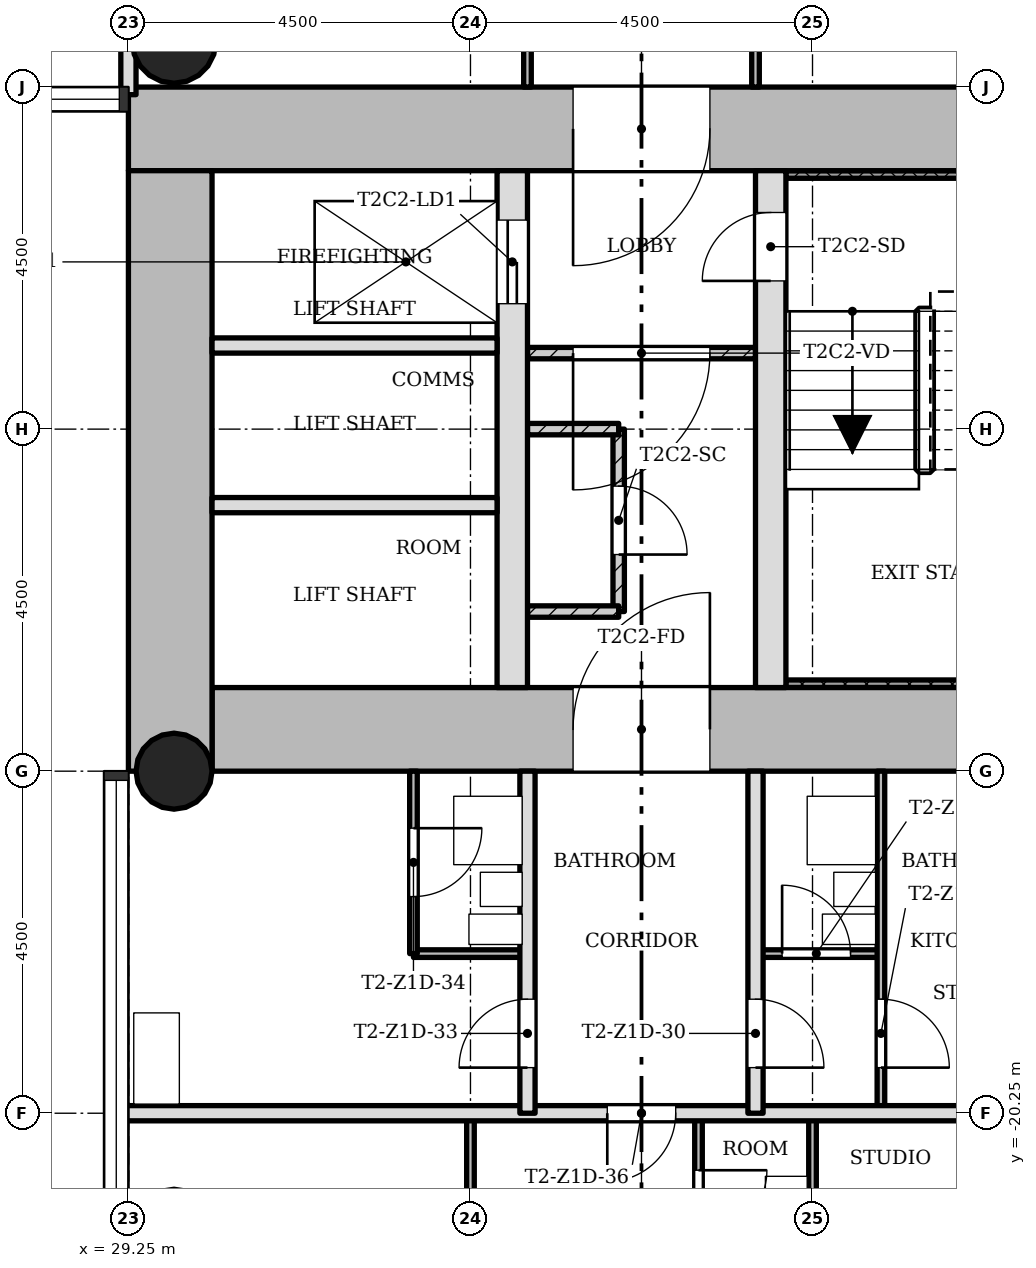
"""IFC4 building model, lengths in metres.
Left out: names, types, materials, properties, quantities, classifications, styles, units other than length and angle.
Written with IfcOpenShell. Run it as: python <this file> out.ifc"""

import sys

from ifc_helpers import new_model, si_unit, direction, frame, frame_2d, origin, origin_2d, place, context, subcontext, project, spatial, rectangle, hollow_circle, extrude, element, fill, save


model = new_model("IFC4")
c1 = context("Model", 3, precision=1e-05, world=origin(), true_north=direction((0.0, 1.0)))
c2 = subcontext(c1, "Body", "Model", "MODEL_VIEW")
j1 = project(units=[si_unit("LENGTHUNIT", "METRE"), si_unit("PLANEANGLEUNIT", "RADIAN")], contexts=[c1])
p1 = place(None, origin())
s1 = spatial("IfcSite", under=j1, at=p1, CompositionType="ELEMENT")
p2 = place(p1, origin())
s2 = spatial("IfcBuilding", under=s1, at=p2, CompositionType="ELEMENT")
p3 = place(p2, frame((0.0, 0.0, 61.9)))
s3 = spatial("IfcBuildingStorey", under=s2, at=p3, CompositionType="ELEMENT", Elevation=61.9)
p4 = place(p3, frame((30.35, -15.2, 0.0), z_axis=(0.0, 0.0, 1.0), x_axis=(1.0, 0.0, 0.0)))
e1 = element("IfcWall", 1, at=p4, inside=s3, PredefinedType="SHEAR", context=c2, shape_type="SweptSolid", body=[
    extrude(rectangle(XDim=12.4, YDim=1.1, at=frame_2d((6.2, 0.0))), origin(), (0.0, 0.0, 1.0), 3.4),
])
p5 = place(p4, frame((4.75, 0.0, 0.0)))
e2 = element("IfcOpeningElement", 2, at=p5, cuts=e1, PredefinedType="OPENING", context=c2, shape_type="SweptSolid", body=[
    extrude(rectangle(XDim=1.8, YDim=2.1, at=frame_2d((0.9, 1.05))), frame((0.0, 0.56, 0.0), z_axis=(0.0, -1.0, 0.0), x_axis=(1.0, 0.0, 0.0)), (0.0, 0.0, 1.0), 1.12),
])
p6 = place(p3, frame((41.65, -7.3, 0.0), z_axis=(0.0, 0.0, 1.0), x_axis=(-1.0, 0.0, 0.0)))
e3 = element("IfcWall", 3, at=p6, inside=s3, PredefinedType="SHEAR", context=c2, shape_type="SweptSolid", body=[
    extrude(rectangle(XDim=12.4, YDim=1.1, at=frame_2d((6.2, 0.0))), origin(), (0.0, 0.0, 1.0), 3.4),
])
p7 = place(p6, frame((4.75, 0.0, 0.0)))
e4 = element("IfcOpeningElement", 4, at=p7, cuts=e3, PredefinedType="OPENING", context=c2, shape_type="SweptSolid", body=[
    extrude(rectangle(XDim=1.8, YDim=2.1, at=frame_2d((0.9, 1.05))), frame((0.0, 0.56, 0.0), z_axis=(0.0, -1.0, 0.0), x_axis=(1.0, 0.0, 0.0)), (0.0, 0.0, 1.0), 1.12),
])
p8 = place(p3, frame((29.8, -7.85, 0.0), z_axis=(0.0, 0.0, 1.0), x_axis=(0.0, -1.0, 0.0)))
e5 = element("IfcWall", 5, at=p8, inside=s3, PredefinedType="SHEAR", context=c2, shape_type="SweptSolid", body=[
    extrude(rectangle(XDim=7.9, YDim=1.1, at=frame_2d((3.95, 0.0))), origin(), (0.0, 0.0, 1.0), 3.4),
])
p9 = place(p3, frame((34.3, -14.65, 0.0), z_axis=(0.0, 0.0, 1.0), x_axis=(0.0, 1.0, 0.0)))
e6 = element("IfcWall", 6, at=p9, inside=s3, PredefinedType="SHEAR", context=c2, shape_type="SweptSolid", body=[
    extrude(rectangle(XDim=6.8, YDim=0.4, at=frame_2d((3.4, 0.0))), origin(), (0.0, 0.0, 1.0), 3.4),
])
p10 = place(p9, frame((5.05, 0.0, 0.0)))
e7 = element("IfcOpeningElement", 7, at=p10, cuts=e6, PredefinedType="OPENING", context=c2, shape_type="SweptSolid", body=[
    extrude(rectangle(XDim=1.1, YDim=2.1, at=frame_2d((0.55, 1.05))), frame((0.0, 0.21, 0.0), z_axis=(0.0, -1.0, 0.0), x_axis=(1.0, 0.0, 0.0)), (0.0, 0.0, 1.0), 0.42),
])
p11 = place(p3, frame((37.7, -14.65, 0.0), z_axis=(0.0, 0.0, 1.0), x_axis=(0.0, 1.0, 0.0)))
e8 = element("IfcWall", 8, at=p11, inside=s3, PredefinedType="SHEAR", context=c2, shape_type="SweptSolid", body=[
    extrude(rectangle(XDim=6.8, YDim=0.4, at=frame_2d((3.4, 0.0))), origin(), (0.0, 0.0, 1.0), 3.4),
])
p12 = place(p11, frame((5.35, 0.0, 0.0)))
e9 = element("IfcOpeningElement", 9, at=p12, cuts=e8, PredefinedType="OPENING", context=c2, shape_type="SweptSolid", body=[
    extrude(rectangle(XDim=0.9, YDim=2.1, at=frame_2d((0.45, 1.05))), frame((0.0, 0.21, 0.0), z_axis=(0.0, -1.0, 0.0), x_axis=(1.0, 0.0, 0.0)), (0.0, 0.0, 1.0), 0.42),
])
p13 = place(p3, frame((29.85, -15.75, 0.0), z_axis=(0.0, 0.0, 1.0), x_axis=(1.0, 0.0, 0.0)))
e10 = element("IfcColumn", 10, at=p13, inside=s3, PredefinedType="COLUMN", context=c2, shape_type="SweptSolid", body=[
    extrude(hollow_circle(Radius=0.5, WallThickness=0.036, at=origin_2d()), origin(), (0.0, 0.0, 1.0), 3.4),
])
p14 = place(p3, frame((29.85, -6.15, 0.0), z_axis=(0.0, 0.0, 1.0), x_axis=(1.0, 0.0, 0.0)))
e11 = element("IfcColumn", 11, at=p14, inside=s3, PredefinedType="COLUMN", context=c2, shape_type="SweptSolid", body=[
    extrude(hollow_circle(Radius=0.55, WallThickness=0.04, at=origin_2d()), origin(), (0.0, 0.0, 1.0), 3.4),
])
p15 = place(p3, frame((34.5, -10.25, 0.0), z_axis=(0.0, 0.0, 1.0), x_axis=(1.0, 0.0, 0.0)))
e12 = element("IfcWall", 12, at=p15, inside=s3, PredefinedType="PARTITIONING", context=c2, shape_type="SweptSolid", body=[
    extrude(rectangle(XDim=3.0, YDim=0.15, at=frame_2d((1.5, 0.0))), origin(), (0.0, 0.0, 1.0), 3.0),
])
p16 = place(p15, frame((0.6, 0.0, 0.0)))
e13 = element("IfcOpeningElement", 13, at=p16, cuts=e12, PredefinedType="OPENING", context=c2, shape_type="SweptSolid", body=[
    extrude(rectangle(XDim=1.8, YDim=2.1, at=frame_2d((0.9, 1.05))), frame((0.0, 0.085, 0.0), z_axis=(0.0, -1.0, 0.0), x_axis=(1.0, 0.0, 0.0)), (0.0, 0.0, 1.0), 0.17),
])
for number, where, z_axis, x_axis in (
    (14, (30.35, -10.15, 0.0), (0.0, 0.0, 1.0), (1.0, 0.0, 0.0)),
    (15, (30.35, -12.25, 0.0), (0.0, 0.0, 1.0), (1.0, 0.0, 0.0)),
):
    element("IfcWall", number, at=place(p3, frame(where, z_axis=z_axis, x_axis=x_axis)), inside=s3, PredefinedType="SOLIDWALL", context=c2, shape_type="SweptSolid", body=[
        extrude(rectangle(XDim=3.75, YDim=0.2, at=frame_2d((1.875, 0.0))), origin(), (0.0, 0.0, 1.0), 3.0),
    ])
p17 = place(p3, frame((35.7, -11.25, 0.0), z_axis=(0.0, 0.0, 1.0), x_axis=(0.0, -1.0, 0.0)))
e16 = element("IfcWall", 16, at=p17, inside=s3, PredefinedType="PARTITIONING", context=c2, shape_type="SweptSolid", body=[
    extrude(rectangle(XDim=2.4, YDim=0.15, at=frame_2d((1.2, 0.0))), origin(), (0.0, 0.0, 1.0), 3.0),
])
p18 = place(p17, frame((0.75, 0.0, 0.0)))
e17 = element("IfcOpeningElement", 17, at=p18, cuts=e16, PredefinedType="OPENING", context=c2, shape_type="SweptSolid", body=[
    extrude(rectangle(XDim=0.9, YDim=2.1, at=frame_2d((0.45, 1.05))), frame((0.0, 0.085, 0.0), z_axis=(0.0, -1.0, 0.0), x_axis=(1.0, 0.0, 0.0)), (0.0, 0.0, 1.0), 0.17),
])
for number, where, z_axis, x_axis in (
    (18, (35.7, -11.25, 0.0), (0.0, 0.0, 1.0), (-1.0, 0.0, 0.0)),
    (19, (35.7, -13.65, 0.0), (0.0, 0.0, 1.0), (-1.0, 0.0, 0.0)),
):
    element("IfcWall", number, at=place(p3, frame(where, z_axis=z_axis, x_axis=x_axis)), inside=s3, PredefinedType="PARTITIONING", context=c2, shape_type="SweptSolid", body=[
        extrude(rectangle(XDim=1.2, YDim=0.15, at=frame_2d((0.6, 0.0))), origin(), (0.0, 0.0, 1.0), 3.0),
    ])
p19 = place(p3, frame((42.85, -20.25, 0.0), z_axis=(0.0, 0.0, 1.0), x_axis=(-1.0, 0.0, 0.0)))
e20 = element("IfcWall", 20, at=p19, inside=s3, PredefinedType="SOLIDWALL", context=c2, shape_type="SweptSolid", body=[
    extrude(rectangle(XDim=13.7, YDim=0.2, at=frame_2d((6.85, 0.0))), origin(), (0.0, 0.0, 1.0), 3.0),
])
p20 = place(p19, frame((6.4, 0.0, 0.0)))
e21 = element("IfcOpeningElement", 21, at=p20, cuts=e20, PredefinedType="OPENING", context=c2, shape_type="SweptSolid", body=[
    extrude(rectangle(XDim=0.9, YDim=2.1, at=frame_2d((0.45, 1.05))), frame((0.0, 0.11, 0.0), z_axis=(0.0, -1.0, 0.0), x_axis=(1.0, 0.0, 0.0)), (0.0, 0.0, 1.0), 0.22),
])
p21 = place(p3, frame((39.15, -18.15, 0.0), z_axis=(0.0, 0.0, 1.0), x_axis=(-1.0, 0.0, 0.0)))
e22 = element("IfcWall", 22, at=p21, inside=s3, PredefinedType="PARTITIONING", context=c2, shape_type="SweptSolid", body=[
    extrude(rectangle(XDim=1.65, YDim=0.1, at=frame_2d((0.825, 0.0))), origin(), (0.0, 0.0, 1.0), 3.0),
])
p22 = place(p21, frame((0.4, 0.0, 0.0)))
e23 = element("IfcOpeningElement", 23, at=p22, cuts=e22, PredefinedType="OPENING", context=c2, shape_type="SweptSolid", body=[
    extrude(rectangle(XDim=0.9, YDim=2.1, at=frame_2d((0.45, 1.05))), frame((0.0, 0.06, 0.0), z_axis=(0.0, -1.0, 0.0), x_axis=(1.0, 0.0, 0.0)), (0.0, 0.0, 1.0), 0.12),
])
p23 = place(p3, frame((34.5, -18.15, 0.0), z_axis=(0.0, 0.0, 1.0), x_axis=(-1.0, 0.0, 0.0)))
e24 = element("IfcWall", 24, at=p23, inside=s3, PredefinedType="PARTITIONING", context=c2, shape_type="SweptSolid", body=[
    extrude(rectangle(XDim=1.5, YDim=0.1, at=frame_2d((0.75, 0.0))), origin(), (0.0, 0.0, 1.0), 3.0),
])
p24 = place(p3, frame((39.15, -20.25, 0.0), z_axis=(0.0, 0.0, 1.0), x_axis=(0.0, 1.0, 0.0)))
e25 = element("IfcWall", 25, at=p24, inside=s3, PredefinedType="PARTITIONING", context=c2, shape_type="SweptSolid", body=[
    extrude(rectangle(XDim=4.5, YDim=0.1, at=frame_2d((2.25, 0.0))), origin(), (0.0, 0.0, 1.0), 3.0),
])
p25 = place(p24, frame((0.6, 0.0, 0.0)))
e26 = element("IfcOpeningElement", 26, at=p25, cuts=e25, PredefinedType="OPENING", context=c2, shape_type="SweptSolid", body=[
    extrude(rectangle(XDim=0.9, YDim=2.1, at=frame_2d((0.45, 1.05))), frame((0.0, 0.06, 0.0), z_axis=(0.0, -1.0, 0.0), x_axis=(1.0, 0.0, 0.0)), (0.0, 0.0, 1.0), 0.12),
])
p26 = place(p3, frame((38.25, -24.85, 0.0), z_axis=(0.0, 0.0, 1.0), x_axis=(0.0, 1.0, 0.0)))
e27 = element("IfcWall", 27, at=p26, inside=s3, PredefinedType="PARTITIONING", context=c2, shape_type="SweptSolid", body=[
    extrude(rectangle(XDim=4.6, YDim=0.1, at=frame_2d((2.3, 0.0))), origin(), (0.0, 0.0, 1.0), 3.0),
])
p27 = place(p26, frame((1.25, 0.0, 0.0)))
e28 = element("IfcOpeningElement", 28, at=p27, cuts=e27, PredefinedType="OPENING", context=c2, shape_type="SweptSolid", body=[
    extrude(rectangle(XDim=0.9, YDim=2.1, at=frame_2d((0.45, 1.05))), frame((0.0, 0.06, 0.0), z_axis=(0.0, -1.0, 0.0), x_axis=(1.0, 0.0, 0.0)), (0.0, 0.0, 1.0), 0.12),
])
p28 = place(p3, frame((37.5, -6.75, 0.0), z_axis=(0.0, 0.0, 1.0), x_axis=(0.0, 1.0, 0.0)))
e29 = element("IfcWall", 29, at=p28, inside=s3, PredefinedType="PARTITIONING", context=c2, shape_type="SweptSolid", body=[
    extrude(rectangle(XDim=5.85, YDim=0.1, at=frame_2d((2.925, 0.0))), origin(), (0.0, 0.0, 1.0), 3.0),
])
p29 = place(p28, frame((1.575, 0.0, 0.0)))
e30 = element("IfcOpeningElement", 30, at=p29, cuts=e29, PredefinedType="OPENING", context=c2, shape_type="SweptSolid", body=[
    extrude(rectangle(XDim=0.9, YDim=2.1, at=frame_2d((0.45, 1.05))), frame((0.0, 0.06, 0.0), z_axis=(0.0, -1.0, 0.0), x_axis=(1.0, 0.0, 0.0)), (0.0, 0.0, 1.0), 0.12),
])
p30 = place(p3, frame((37.5, -20.25, 0.0), z_axis=(0.0, 0.0, 1.0), x_axis=(0.0, 1.0, 0.0)))
e31 = element("IfcWall", 31, at=p30, inside=s3, PredefinedType="SOLIDWALL", context=c2, shape_type="SweptSolid", body=[
    extrude(rectangle(XDim=4.5, YDim=0.2, at=frame_2d((2.25, 0.0))), origin(), (0.0, 0.0, 1.0), 3.0),
])
p31 = place(p30, frame((0.6, 0.0, 0.0)))
e32 = element("IfcOpeningElement", 32, at=p31, cuts=e31, PredefinedType="OPENING", context=c2, shape_type="SweptSolid", body=[
    extrude(rectangle(XDim=0.9, YDim=2.1, at=frame_2d((0.45, 1.05))), frame((0.0, 0.11, 0.0), z_axis=(0.0, -1.0, 0.0), x_axis=(1.0, 0.0, 0.0)), (0.0, 0.0, 1.0), 0.22),
])
p32 = place(p3, frame((36.75, -22.65, 0.0), z_axis=(0.0, 0.0, 1.0), x_axis=(0.0, 1.0, 0.0)))
e33 = element("IfcWall", 33, at=p32, inside=s3, PredefinedType="PARTITIONING", context=c2, shape_type="SweptSolid", body=[
    extrude(rectangle(XDim=2.4, YDim=0.1, at=frame_2d((1.2, 0.0))), origin(), (0.0, 0.0, 1.0), 3.0),
])
p33 = place(p32, frame((0.75, 0.0, 0.0)))
e34 = element("IfcOpeningElement", 34, at=p33, cuts=e33, PredefinedType="OPENING", context=c2, shape_type="SweptSolid", body=[
    extrude(rectangle(XDim=0.9, YDim=2.1, at=frame_2d((0.45, 1.05))), frame((0.0, 0.06, 0.0), z_axis=(0.0, -1.0, 0.0), x_axis=(1.0, 0.0, 0.0)), (0.0, 0.0, 1.0), 0.12),
])
p34 = place(p3, frame((34.5, -6.75, 0.0), z_axis=(0.0, 0.0, 1.0), x_axis=(0.0, 1.0, 0.0)))
e35 = element("IfcWall", 35, at=p34, inside=s3, PredefinedType="PARTITIONING", context=c2, shape_type="SweptSolid", body=[
    extrude(rectangle(XDim=5.85, YDim=0.1, at=frame_2d((2.925, 0.0))), origin(), (0.0, 0.0, 1.0), 3.0),
])
p35 = place(p34, frame((2.475, 0.0, 0.0)))
e36 = element("IfcOpeningElement", 36, at=p35, cuts=e35, PredefinedType="OPENING", context=c2, shape_type="SweptSolid", body=[
    extrude(rectangle(XDim=0.9, YDim=2.1, at=frame_2d((0.45, 1.05))), frame((0.0, 0.06, 0.0), z_axis=(0.0, -1.0, 0.0), x_axis=(1.0, 0.0, 0.0)), (0.0, 0.0, 1.0), 0.12),
])
p36 = place(p3, frame((34.5, -20.25, 0.0), z_axis=(0.0, 0.0, 1.0), x_axis=(0.0, 1.0, 0.0)))
e37 = element("IfcWall", 37, at=p36, inside=s3, PredefinedType="SOLIDWALL", context=c2, shape_type="SweptSolid", body=[
    extrude(rectangle(XDim=4.5, YDim=0.2, at=frame_2d((2.25, 0.0))), origin(), (0.0, 0.0, 1.0), 3.0),
])
p37 = place(p36, frame((0.6, 0.0, 0.0)))
e38 = element("IfcOpeningElement", 38, at=p37, cuts=e37, PredefinedType="OPENING", context=c2, shape_type="SweptSolid", body=[
    extrude(rectangle(XDim=0.9, YDim=2.1, at=frame_2d((0.45, 1.05))), frame((0.0, 0.11, 0.0), z_axis=(0.0, -1.0, 0.0), x_axis=(1.0, 0.0, 0.0)), (0.0, 0.0, 1.0), 0.22),
])
p38 = place(p3, frame((33.75, -24.85, 0.0), z_axis=(0.0, 0.0, 1.0), x_axis=(0.0, 1.0, 0.0)))
e39 = element("IfcWall", 39, at=p38, inside=s3, PredefinedType="PARTITIONING", context=c2, shape_type="SweptSolid", body=[
    extrude(rectangle(XDim=4.6, YDim=0.1, at=frame_2d((2.3, 0.0))), origin(), (0.0, 0.0, 1.0), 3.0),
])
p39 = place(p38, frame((1.9, 0.0, 0.0)))
e40 = element("IfcOpeningElement", 40, at=p39, cuts=e39, PredefinedType="OPENING", context=c2, shape_type="SweptSolid", body=[
    extrude(rectangle(XDim=0.9, YDim=2.1, at=frame_2d((0.45, 1.05))), frame((0.0, 0.06, 0.0), z_axis=(0.0, -1.0, 0.0), x_axis=(1.0, 0.0, 0.0)), (0.0, 0.0, 1.0), 0.12),
])
p40 = place(p3, frame((33.0, -18.15, 0.0), z_axis=(0.0, 0.0, 1.0), x_axis=(0.0, 1.0, 0.0)))
e41 = element("IfcWall", 41, at=p40, inside=s3, PredefinedType="PARTITIONING", context=c2, shape_type="SweptSolid", body=[
    extrude(rectangle(XDim=2.4, YDim=0.1, at=frame_2d((1.2, 0.0))), origin(), (0.0, 0.0, 1.0), 3.0),
])
p41 = place(p40, frame((0.75, 0.0, 0.0)))
e42 = element("IfcOpeningElement", 42, at=p41, cuts=e41, PredefinedType="OPENING", context=c2, shape_type="SweptSolid", body=[
    extrude(rectangle(XDim=0.9, YDim=2.1, at=frame_2d((0.45, 1.05))), frame((0.0, 0.06, 0.0), z_axis=(0.0, -1.0, 0.0), x_axis=(1.0, 0.0, 0.0)), (0.0, 0.0, 1.0), 0.12),
])
p42 = place(p3, frame((29.25, -6.85, 0.0), z_axis=(0.0, 0.0, 1.0), x_axis=(0.0, 1.0, 0.0)))
e43 = element("IfcWall", 43, at=p42, inside=s3, PredefinedType="SOLIDWALL", context=c2, shape_type="SweptSolid", body=[
    extrude(rectangle(XDim=13.7, YDim=0.2, at=frame_2d((6.85, 0.0))), origin(), (0.0, 0.0, 1.0), 3.0),
])
p43 = place(p42, frame((6.4, 0.0, 0.0)))
e44 = element("IfcOpeningElement", 44, at=p43, cuts=e43, PredefinedType="OPENING", context=c2, shape_type="SweptSolid", body=[
    extrude(rectangle(XDim=0.9, YDim=2.1, at=frame_2d((0.45, 1.05))), frame((0.0, 0.11, 0.0), z_axis=(0.0, -1.0, 0.0), x_axis=(1.0, 0.0, 0.0)), (0.0, 0.0, 1.0), 0.22),
])
for number, where, z_axis, x_axis in (
    (45, (37.9, -14.6, 0.0), (0.0, 0.0, 1.0), (1.0, 0.0, 0.0)),
    (46, (37.9, -7.9, 0.0), (0.0, 0.0, 1.0), (1.0, 0.0, 0.0)),
):
    element("IfcWall", number, at=place(p3, frame(where, z_axis=z_axis, x_axis=x_axis)), inside=s3, PredefinedType="SHEAR", context=c2, shape_type="SweptSolid", body=[
        extrude(rectangle(XDim=3.75, YDim=0.1, at=frame_2d((1.875, 0.0))), origin(), (0.0, 0.0, 1.0), 3.4),
    ])
p44 = place(p16, origin())
e47 = element("IfcDoor", 47, at=p44, inside=s3, OperationType="SINGLE_SWING_LEFT", PredefinedType="DOOR", context=c2, shape_type="SweptSolid", body=[
    extrude(rectangle(XDim=1.8, YDim=2.1, at=frame_2d((0.9, 1.05))), frame((0.0, 0.025, 0.0), z_axis=(0.0, -1.0, 0.0), x_axis=(1.0, 0.0, 0.0)), (0.0, 0.0, 1.0), 0.05),
])
fill(e13, e47)
p45 = place(p18, origin())
e48 = element("IfcDoor", 48, at=p45, inside=s3, OperationType="SINGLE_SWING_LEFT", PredefinedType="DOOR", context=c2, shape_type="SweptSolid", body=[
    extrude(rectangle(XDim=0.9, YDim=2.1, at=frame_2d((0.45, 1.05))), frame((0.0, 0.025, 0.0), z_axis=(0.0, -1.0, 0.0), x_axis=(1.0, 0.0, 0.0)), (0.0, 0.0, 1.0), 0.05),
])
fill(e17, e48)
p46 = place(p31, origin())
e49 = element("IfcDoor", 49, at=p46, inside=s3, OperationType="SINGLE_SWING_LEFT", PredefinedType="DOOR", context=c2, shape_type="SweptSolid", body=[
    extrude(rectangle(XDim=0.9, YDim=2.1, at=frame_2d((0.45, 1.05))), frame((0.0, 0.025, 0.0), z_axis=(0.0, -1.0, 0.0), x_axis=(1.0, 0.0, 0.0)), (0.0, 0.0, 1.0), 0.05),
])
fill(e32, e49)
p47 = place(p25, origin())
e50 = element("IfcDoor", 50, at=p47, inside=s3, OperationType="SINGLE_SWING_LEFT", PredefinedType="DOOR", context=c2, shape_type="SweptSolid", body=[
    extrude(rectangle(XDim=0.9, YDim=2.1, at=frame_2d((0.45, 1.05))), frame((0.0, 0.025, 0.0), z_axis=(0.0, -1.0, 0.0), x_axis=(1.0, 0.0, 0.0)), (0.0, 0.0, 1.0), 0.05),
])
fill(e26, e50)
p48 = place(p22, origin())
e51 = element("IfcDoor", 51, at=p48, inside=s3, OperationType="SINGLE_SWING_RIGHT", PredefinedType="DOOR", context=c2, shape_type="SweptSolid", body=[
    extrude(rectangle(XDim=0.9, YDim=2.1, at=frame_2d((0.45, 1.05))), frame((0.0, 0.025, 0.0), z_axis=(0.0, -1.0, 0.0), x_axis=(1.0, 0.0, 0.0)), (0.0, 0.0, 1.0), 0.05),
])
fill(e23, e51)
p49 = place(p37, origin())
e52 = element("IfcDoor", 52, at=p49, inside=s3, OperationType="SINGLE_SWING_RIGHT", PredefinedType="DOOR", context=c2, shape_type="SweptSolid", body=[
    extrude(rectangle(XDim=0.9, YDim=2.1, at=frame_2d((0.45, 1.05))), frame((0.0, 0.025, 0.0), z_axis=(0.0, -1.0, 0.0), x_axis=(1.0, 0.0, 0.0)), (0.0, 0.0, 1.0), 0.05),
])
fill(e38, e52)
p50 = place(p41, origin())
e53 = element("IfcDoor", 53, at=p50, inside=s3, OperationType="SINGLE_SWING_RIGHT", PredefinedType="DOOR", context=c2, shape_type="SweptSolid", body=[
    extrude(rectangle(XDim=0.9, YDim=2.1, at=frame_2d((0.45, 1.05))), frame((0.0, 0.025, 0.0), z_axis=(0.0, -1.0, 0.0), x_axis=(1.0, 0.0, 0.0)), (0.0, 0.0, 1.0), 0.05),
])
fill(e42, e53)
p51 = place(p33, origin())
e54 = element("IfcDoor", 54, at=p51, inside=s3, OperationType="SINGLE_SWING_RIGHT", PredefinedType="DOOR", context=c2, shape_type="SweptSolid", body=[
    extrude(rectangle(XDim=0.9, YDim=2.1, at=frame_2d((0.45, 1.05))), frame((0.0, 0.025, 0.0), z_axis=(0.0, -1.0, 0.0), x_axis=(1.0, 0.0, 0.0)), (0.0, 0.0, 1.0), 0.05),
])
fill(e34, e54)
p52 = place(p20, origin())
e55 = element("IfcDoor", 55, at=p52, inside=s3, OperationType="SINGLE_SWING_LEFT", PredefinedType="DOOR", context=c2, shape_type="SweptSolid", body=[
    extrude(rectangle(XDim=0.9, YDim=2.1, at=frame_2d((0.45, 1.05))), frame((0.0, 0.025, 0.0), z_axis=(0.0, -1.0, 0.0), x_axis=(1.0, 0.0, 0.0)), (0.0, 0.0, 1.0), 0.05),
])
fill(e21, e55)
p53 = place(p12, origin())
e56 = element("IfcDoor", 56, at=p53, inside=s3, OperationType="SINGLE_SWING_RIGHT", PredefinedType="DOOR", context=c2, shape_type="SweptSolid", body=[
    extrude(rectangle(XDim=0.9, YDim=2.1, at=frame_2d((0.45, 1.05))), frame((0.0, 0.025, 0.0), z_axis=(0.0, -1.0, 0.0), x_axis=(1.0, 0.0, 0.0)), (0.0, 0.0, 1.0), 0.05),
])
fill(e9, e56)
p54 = place(p10, origin())
e57 = element("IfcDoor", 57, at=p54, inside=s3, OperationType="SLIDING_TO_LEFT", PredefinedType="DOOR", context=c2, shape_type="SweptSolid", body=[
    extrude(rectangle(XDim=1.1, YDim=2.1, at=frame_2d((0.55, 1.05))), frame((0.0, 0.025, 0.0), z_axis=(0.0, -1.0, 0.0), x_axis=(1.0, 0.0, 0.0)), (0.0, 0.0, 1.0), 0.05),
])
fill(e7, e57)
p55 = place(p7, origin())
e58 = element("IfcDoor", 58, at=p55, inside=s3, OperationType="SINGLE_SWING_LEFT", PredefinedType="DOOR", context=c2, shape_type="SweptSolid", body=[
    extrude(rectangle(XDim=1.8, YDim=2.1, at=frame_2d((0.9, 1.05))), frame((0.0, 0.025, 0.0), z_axis=(0.0, -1.0, 0.0), x_axis=(1.0, 0.0, 0.0)), (0.0, 0.0, 1.0), 0.05),
])
fill(e4, e58)
p56 = place(p5, origin())
e59 = element("IfcDoor", 59, at=p56, inside=s3, OperationType="SINGLE_SWING_LEFT", PredefinedType="DOOR", context=c2, shape_type="SweptSolid", body=[
    extrude(rectangle(XDim=1.8, YDim=2.1, at=frame_2d((0.9, 1.05))), frame((0.0, 0.025, 0.0), z_axis=(0.0, -1.0, 0.0), x_axis=(1.0, 0.0, 0.0)), (0.0, 0.0, 1.0), 0.05),
])
fill(e2, e59)
save(model, sys.argv[1])
